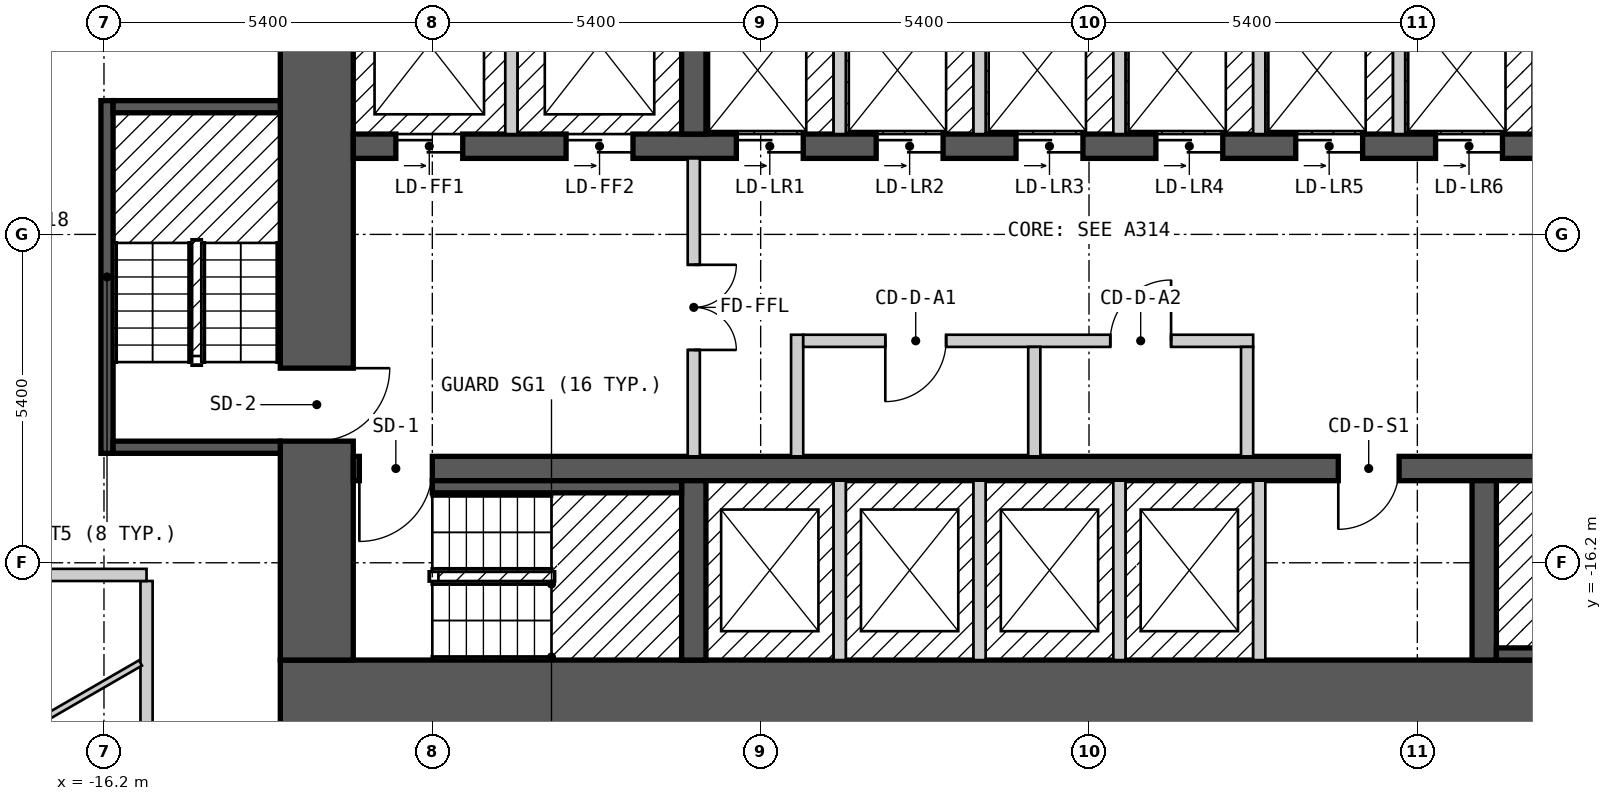
"""IFC4 building model, lengths in metres.
Left out: names, types, materials, properties, quantities, classifications, styles, units other than length and angle.
Written with IfcOpenShell. Run it as: python <this file> out.ifc"""

import sys

from ifc_helpers import new_model, si_unit, direction, frame, frame_2d, origin, place, context, subcontext, project, spatial, rectangle, extrude, element, fill, save


model = new_model("IFC4")
c1 = context("Model", 3, precision=1e-05, world=origin(), true_north=direction((0.0, 1.0)))
c2 = subcontext(c1, "Body", "Model", "MODEL_VIEW")
j1 = project(units=[si_unit("LENGTHUNIT", "METRE"), si_unit("PLANEANGLEUNIT", "RADIAN")], contexts=[c1])
p1 = place(None, origin())
s1 = spatial("IfcSite", under=j1, at=p1, CompositionType="ELEMENT")
p2 = place(p1, origin())
s2 = spatial("IfcBuilding", under=s1, at=p2, CompositionType="ELEMENT")
p3 = place(p2, frame((0.0, 0.0, 41.4)))
s3 = spatial("IfcBuildingStorey", under=s2, at=p3, CompositionType="ELEMENT", Elevation=41.4)
p4 = place(p3, frame((-13.3, -18.4, 0.0), z_axis=(0.0, 0.0, 1.0), x_axis=(1.0, 0.0, 0.0)))
e1 = element("IfcWall", 1, at=p4, inside=s3, PredefinedType="SHEAR", context=c2, shape_type="SweptSolid", body=[
    extrude(rectangle(XDim=26.6, YDim=1.2, at=frame_2d((13.3, 0.0))), origin(), (0.0, 0.0, 1.0), 2.7),
])
p5 = place(p3, frame((-12.7, -17.8, 0.0), z_axis=(0.0, 0.0, 1.0), x_axis=(0.0, 1.0, 0.0)))
e2 = element("IfcWall", 2, at=p5, inside=s3, PredefinedType="SHEAR", context=c2, shape_type="SweptSolid", body=[
    extrude(rectangle(XDim=11.6, YDim=1.2, at=frame_2d((5.8, 0.0))), origin(), (0.0, 0.0, 1.0), 2.7),
])
p6 = place(p5, frame((3.6, 0.0, 0.0)))
e3 = element("IfcOpeningElement", 3, at=p6, cuts=e2, PredefinedType="OPENING", context=c2, shape_type="SweptSolid", body=[
    extrude(rectangle(XDim=1.2, YDim=2.1, at=frame_2d((0.6, 1.05))), frame((0.0, 0.61, 0.0), z_axis=(0.0, -1.0, 0.0), x_axis=(1.0, 0.0, 0.0)), (0.0, 0.0, 1.0), 1.22),
])
p7 = place(p3, frame((-12.1, -14.65, 0.0), z_axis=(0.0, 0.0, 1.0), x_axis=(1.0, 0.0, 0.0)))
e4 = element("IfcWall", 4, at=p7, inside=s3, PredefinedType="SHEAR", context=c2, shape_type="SweptSolid", body=[
    extrude(rectangle(XDim=24.2, YDim=0.4, at=frame_2d((12.1, 0.0))), origin(), (0.0, 0.0, 1.0), 2.7),
])
p8 = place(p7, frame((1.3, 0.0, 0.0), z_axis=(0.0, 0.0, 1.0), x_axis=(-1.0, 0.0, 0.0)))
e5 = element("IfcOpeningElement", 5, at=p8, cuts=e4, PredefinedType="OPENING", context=c2, shape_type="SweptSolid", body=[
    extrude(rectangle(XDim=1.2, YDim=2.1, at=frame_2d((0.6, 1.05))), frame((0.0, 0.21, 0.0), z_axis=(0.0, -1.0, 0.0), x_axis=(1.0, 0.0, 0.0)), (0.0, 0.0, 1.0), 0.42),
])
p9 = place(p7, frame((24.15, 0.0, 0.0), z_axis=(0.0, 0.0, 1.0), x_axis=(-1.0, 0.0, 0.0)))
e6 = element("IfcOpeningElement", 6, at=p9, cuts=e4, PredefinedType="OPENING", context=c2, shape_type="SweptSolid", body=[
    extrude(rectangle(XDim=1.2, YDim=2.1, at=frame_2d((0.6, 1.05))), frame((0.0, 0.21, 0.0), z_axis=(0.0, -1.0, 0.0), x_axis=(1.0, 0.0, 0.0)), (0.0, 0.0, 1.0), 0.42),
])
p10 = place(p7, frame((17.2, 0.0, 0.0), z_axis=(0.0, 0.0, 1.0), x_axis=(-1.0, 0.0, 0.0)))
e7 = element("IfcOpeningElement", 7, at=p10, cuts=e4, PredefinedType="OPENING", context=c2, shape_type="SweptSolid", body=[
    extrude(rectangle(XDim=1.0, YDim=2.1, at=frame_2d((0.5, 1.05))), frame((0.0, 0.21, 0.0), z_axis=(0.0, -1.0, 0.0), x_axis=(1.0, 0.0, 0.0)), (0.0, 0.0, 1.0), 0.42),
])
p11 = place(p3, frame((-12.1, -9.35, 0.0), z_axis=(0.0, 0.0, 1.0), x_axis=(1.0, 0.0, 0.0)))
e8 = element("IfcWall", 8, at=p11, inside=s3, PredefinedType="SHEAR", context=c2, shape_type="SweptSolid", body=[
    extrude(rectangle(XDim=22.3, YDim=0.4, at=frame_2d((11.15, 0.0))), origin(), (0.0, 0.0, 1.0), 2.7),
])
p12 = place(p11, frame((0.7, 0.0, 0.0)))
e9 = element("IfcOpeningElement", 9, at=p12, cuts=e8, PredefinedType="OPENING", context=c2, shape_type="SweptSolid", body=[
    extrude(rectangle(XDim=1.1, YDim=2.1, at=frame_2d((0.55, 1.05))), frame((0.0, 0.21, 0.0), z_axis=(0.0, -1.0, 0.0), x_axis=(1.0, 0.0, 0.0)), (0.0, 0.0, 1.0), 0.42),
])
p13 = place(p11, frame((3.5, 0.0, 0.0)))
e10 = element("IfcOpeningElement", 10, at=p13, cuts=e8, PredefinedType="OPENING", context=c2, shape_type="SweptSolid", body=[
    extrude(rectangle(XDim=1.1, YDim=2.1, at=frame_2d((0.55, 1.05))), frame((0.0, 0.21, 0.0), z_axis=(0.0, -1.0, 0.0), x_axis=(1.0, 0.0, 0.0)), (0.0, 0.0, 1.0), 0.42),
])
p14 = place(p11, frame((6.3, 0.0, 0.0)))
e11 = element("IfcOpeningElement", 11, at=p14, cuts=e8, PredefinedType="OPENING", context=c2, shape_type="SweptSolid", body=[
    extrude(rectangle(XDim=1.1, YDim=2.1, at=frame_2d((0.55, 1.05))), frame((0.0, 0.21, 0.0), z_axis=(0.0, -1.0, 0.0), x_axis=(1.0, 0.0, 0.0)), (0.0, 0.0, 1.0), 0.42),
])
p15 = place(p11, frame((8.6, 0.0, 0.0)))
e12 = element("IfcOpeningElement", 12, at=p15, cuts=e8, PredefinedType="OPENING", context=c2, shape_type="SweptSolid", body=[
    extrude(rectangle(XDim=1.1, YDim=2.1, at=frame_2d((0.55, 1.05))), frame((0.0, 0.21, 0.0), z_axis=(0.0, -1.0, 0.0), x_axis=(1.0, 0.0, 0.0)), (0.0, 0.0, 1.0), 0.42),
])
p16 = place(p11, frame((10.9, 0.0, 0.0)))
e13 = element("IfcOpeningElement", 13, at=p16, cuts=e8, PredefinedType="OPENING", context=c2, shape_type="SweptSolid", body=[
    extrude(rectangle(XDim=1.1, YDim=2.1, at=frame_2d((0.55, 1.05))), frame((0.0, 0.21, 0.0), z_axis=(0.0, -1.0, 0.0), x_axis=(1.0, 0.0, 0.0)), (0.0, 0.0, 1.0), 0.42),
])
p17 = place(p11, frame((13.2, 0.0, 0.0)))
e14 = element("IfcOpeningElement", 14, at=p17, cuts=e8, PredefinedType="OPENING", context=c2, shape_type="SweptSolid", body=[
    extrude(rectangle(XDim=1.1, YDim=2.1, at=frame_2d((0.55, 1.05))), frame((0.0, 0.21, 0.0), z_axis=(0.0, -1.0, 0.0), x_axis=(1.0, 0.0, 0.0)), (0.0, 0.0, 1.0), 0.42),
])
p18 = place(p11, frame((15.5, 0.0, 0.0)))
e15 = element("IfcOpeningElement", 15, at=p18, cuts=e8, PredefinedType="OPENING", context=c2, shape_type="SweptSolid", body=[
    extrude(rectangle(XDim=1.1, YDim=2.1, at=frame_2d((0.55, 1.05))), frame((0.0, 0.21, 0.0), z_axis=(0.0, -1.0, 0.0), x_axis=(1.0, 0.0, 0.0)), (0.0, 0.0, 1.0), 0.42),
])
p19 = place(p11, frame((17.8, 0.0, 0.0)))
e16 = element("IfcOpeningElement", 16, at=p19, cuts=e8, PredefinedType="OPENING", context=c2, shape_type="SweptSolid", body=[
    extrude(rectangle(XDim=1.1, YDim=2.1, at=frame_2d((0.55, 1.05))), frame((0.0, 0.21, 0.0), z_axis=(0.0, -1.0, 0.0), x_axis=(1.0, 0.0, 0.0)), (0.0, 0.0, 1.0), 0.42),
])
p20 = place(p11, frame((20.2, 0.0, 0.0)))
e17 = element("IfcOpeningElement", 17, at=p20, cuts=e8, PredefinedType="OPENING", context=c2, shape_type="SweptSolid", body=[
    extrude(rectangle(XDim=1.1, YDim=2.1, at=frame_2d((0.55, 1.05))), frame((0.0, 0.21, 0.0), z_axis=(0.0, -1.0, 0.0), x_axis=(1.0, 0.0, 0.0)), (0.0, 0.0, 1.0), 0.42),
])
for number, where, z_axis, x_axis in (
    (18, (-6.5, -17.8, 0.0), (0.0, 0.0, 1.0), (0.0, 1.0, 0.0)),
    (19, (6.5, -17.8, 0.0), (0.0, 0.0, 1.0), (0.0, 1.0, 0.0)),
    (20, (-6.5, -9.15, 0.0), (0.0, 0.0, 1.0), (0.0, 1.0, 0.0)),
):
    element("IfcWall", number, at=place(p3, frame(where, z_axis=z_axis, x_axis=x_axis)), inside=s3, PredefinedType="SHEAR", context=c2, shape_type="SweptSolid", body=[
        extrude(rectangle(XDim=2.95, YDim=0.4, at=frame_2d((1.475, 0.0))), origin(), (0.0, 0.0, 1.0), 2.7),
    ])
p21 = place(p3, frame((-15.5, -16.5, 0.0), z_axis=(0.0, 0.0, 1.0), x_axis=(0.0, -1.0, 0.0)))
e21 = element("IfcWall", 21, at=p21, inside=s3, PredefinedType="PARTITIONING", context=c2, shape_type="SweptSolid", body=[
    extrude(rectangle(XDim=4.599, YDim=0.2, at=frame_2d((2.3, 0.0))), origin(), (0.0, 0.0, 1.0), 2.7),
])
p22 = place(p3, frame((-18.249, -16.4, 0.0), z_axis=(0.0, 0.0, 1.0), x_axis=(1.0, 0.0, 0.0)))
e22 = element("IfcWall", 22, at=p22, inside=s3, PredefinedType="PARTITIONING", context=c2, shape_type="SweptSolid", body=[
    extrude(rectangle(XDim=2.749, YDim=0.2, at=frame_2d((1.375, 0.0))), origin(), (0.0, 0.0, 1.0), 2.7),
])
p23 = place(p3, frame((-20.507, -20.681, 0.0), z_axis=(0.0, 0.0, 1.0), x_axis=(0.866028446103, 0.499994730513, 0.0)))
e23 = element("IfcWall", 23, at=p23, inside=s3, PredefinedType="PARTITIONING", context=c2, shape_type="SweptSolid", body=[
    extrude(rectangle(XDim=5.666, YDim=0.1, at=frame_2d((2.833, 0.0))), origin(), (0.0, 0.0, 1.0), 2.7),
])
p24 = place(p23, frame((2.44, 0.0, 0.0)))
e24 = element("IfcOpeningElement", 24, at=p24, cuts=e23, PredefinedType="OPENING", context=c2, shape_type="SweptSolid", body=[
    extrude(rectangle(XDim=0.9, YDim=2.1, at=frame_2d((0.45, 1.05))), frame((0.0, 0.06, 0.0), z_axis=(0.0, -1.0, 0.0), x_axis=(1.0, 0.0, 0.0)), (0.0, 0.0, 1.0), 0.12),
])
p25 = place(p3, frame((-16.15, -14.4, 0.0), z_axis=(0.0, 0.0, 1.0), x_axis=(0.0, 1.0, 0.0)))
e25 = element("IfcWall", 25, at=p25, inside=s3, PredefinedType="SOLIDWALL", context=c2, shape_type="SweptSolid", body=[
    extrude(rectangle(XDim=5.8, YDim=0.2, at=frame_2d((2.9, 0.0))), origin(), (0.0, 0.0, 1.0), 2.7),
])
for number, where, z_axis, x_axis in (
    (26, (-16.05, -14.3, 0.0), (0.0, 0.0, 1.0), (1.0, 0.0, 0.0)),
    (27, (-16.05, -8.7, 0.0), (0.0, 0.0, 1.0), (1.0, 0.0, 0.0)),
):
    element("IfcWall", number, at=place(p3, frame(where, z_axis=z_axis, x_axis=x_axis)), inside=s3, PredefinedType="SOLIDWALL", context=c2, shape_type="SweptSolid", body=[
        extrude(rectangle(XDim=2.75, YDim=0.2, at=frame_2d((1.375, 0.0))), origin(), (0.0, 0.0, 1.0), 2.7),
    ])
p26 = place(p3, frame((-10.8, -14.95, 0.0), z_axis=(0.0, 0.0, 1.0), x_axis=(1.0, 0.0, 0.0)))
e28 = element("IfcWall", 28, at=p26, inside=s3, PredefinedType="SOLIDWALL", context=c2, shape_type="SweptSolid", body=[
    extrude(rectangle(XDim=4.1, YDim=0.2, at=frame_2d((2.05, 0.0))), origin(), (0.0, 0.0, 1.0), 2.7),
])
p27 = place(p3, frame((-9.5, -9.15, 0.0), z_axis=(0.0, 0.0, 1.0), x_axis=(0.0, 1.0, 0.0)))
e29 = element("IfcWall", 29, at=p27, inside=s3, PredefinedType="SOLIDWALL", context=c2, shape_type="SweptSolid", body=[
    extrude(rectangle(XDim=2.95, YDim=0.2, at=frame_2d((1.475, 0.0))), origin(), (0.0, 0.0, 1.0), 2.7),
])
p28 = place(p3, frame((-6.5, -14.45, 0.0), z_axis=(0.0, 0.0, 1.0), x_axis=(0.0, 1.0, 0.0)))
e30 = element("IfcWall", 30, at=p28, inside=s3, PredefinedType="PARTITIONING", context=c2, shape_type="SweptSolid", body=[
    extrude(rectangle(XDim=4.9, YDim=0.2, at=frame_2d((2.45, 0.0))), origin(), (0.0, 0.0, 1.0), 2.7),
])
p29 = place(p28, frame((3.15, 0.0, 0.0), z_axis=(0.0, 0.0, 1.0), x_axis=(-1.0, 0.0, 0.0)))
e31 = element("IfcOpeningElement", 31, at=p29, cuts=e30, PredefinedType="OPENING", context=c2, shape_type="SweptSolid", body=[
    extrude(rectangle(XDim=1.4, YDim=2.1, at=frame_2d((0.7, 1.05))), frame((0.0, 0.11, 0.0), z_axis=(0.0, -1.0, 0.0), x_axis=(1.0, 0.0, 0.0)), (0.0, 0.0, 1.0), 0.22),
])
p30 = place(p3, frame((-4.8, -14.45, 0.0), z_axis=(0.0, 0.0, 1.0), x_axis=(0.0, 1.0, 0.0)))
e32 = element("IfcWall", 32, at=p30, inside=s3, PredefinedType="PARTITIONING", context=c2, shape_type="SweptSolid", body=[
    extrude(rectangle(XDim=2.0, YDim=0.2, at=frame_2d((1.0, 0.0))), origin(), (0.0, 0.0, 1.0), 2.7),
])
p31 = place(p3, frame((-4.7, -12.55, 0.0), z_axis=(0.0, 0.0, 1.0), x_axis=(1.0, 0.0, 0.0)))
e33 = element("IfcWall", 33, at=p31, inside=s3, PredefinedType="PARTITIONING", context=c2, shape_type="SweptSolid", body=[
    extrude(rectangle(XDim=7.4, YDim=0.2, at=frame_2d((3.7, 0.0))), origin(), (0.0, 0.0, 1.0), 2.7),
])
p32 = place(p31, frame((2.35, 0.0, 0.0), z_axis=(0.0, 0.0, 1.0), x_axis=(-1.0, 0.0, 0.0)))
e34 = element("IfcOpeningElement", 34, at=p32, cuts=e33, PredefinedType="OPENING", context=c2, shape_type="SweptSolid", body=[
    extrude(rectangle(XDim=1.0, YDim=2.1, at=frame_2d((0.5, 1.05))), frame((0.0, 0.11, 0.0), z_axis=(0.0, -1.0, 0.0), x_axis=(1.0, 0.0, 0.0)), (0.0, 0.0, 1.0), 0.22),
])
p33 = place(p31, frame((6.05, 0.0, 0.0), z_axis=(0.0, 0.0, 1.0), x_axis=(-1.0, 0.0, 0.0)))
e35 = element("IfcOpeningElement", 35, at=p33, cuts=e33, PredefinedType="OPENING", context=c2, shape_type="SweptSolid", body=[
    extrude(rectangle(XDim=1.0, YDim=2.1, at=frame_2d((0.5, 1.05))), frame((0.0, 0.11, 0.0), z_axis=(0.0, -1.0, 0.0), x_axis=(1.0, 0.0, 0.0)), (0.0, 0.0, 1.0), 0.22),
])
for number, where, z_axis, x_axis in (
    (36, (-4.1, -17.8, 0.0), (0.0, 0.0, 1.0), (0.0, 1.0, 0.0)),
    (37, (-4.1, -9.15, 0.0), (0.0, 0.0, 1.0), (0.0, 1.0, 0.0)),
    (38, (-1.8, -17.8, 0.0), (0.0, 0.0, 1.0), (0.0, 1.0, 0.0)),
    (39, (-1.8, -9.15, 0.0), (0.0, 0.0, 1.0), (0.0, 1.0, 0.0)),
):
    element("IfcWall", number, at=place(p3, frame(where, z_axis=z_axis, x_axis=x_axis)), inside=s3, PredefinedType="SOLIDWALL", context=c2, shape_type="SweptSolid", body=[
        extrude(rectangle(XDim=2.95, YDim=0.2, at=frame_2d((1.475, 0.0))), origin(), (0.0, 0.0, 1.0), 2.7),
    ])
p34 = place(p3, frame((-0.9, -14.45, 0.0), z_axis=(0.0, 0.0, 1.0), x_axis=(0.0, 1.0, 0.0)))
e40 = element("IfcWall", 40, at=p34, inside=s3, PredefinedType="PARTITIONING", context=c2, shape_type="SweptSolid", body=[
    extrude(rectangle(XDim=1.8, YDim=0.2, at=frame_2d((0.9, 0.0))), origin(), (0.0, 0.0, 1.0), 2.7),
])
for number, where, z_axis, x_axis in (
    (41, (0.5, -17.8, 0.0), (0.0, 0.0, 1.0), (0.0, 1.0, 0.0)),
    (42, (0.5, -9.15, 0.0), (0.0, 0.0, 1.0), (0.0, 1.0, 0.0)),
):
    element("IfcWall", number, at=place(p3, frame(where, z_axis=z_axis, x_axis=x_axis)), inside=s3, PredefinedType="SOLIDWALL", context=c2, shape_type="SweptSolid", body=[
        extrude(rectangle(XDim=2.95, YDim=0.2, at=frame_2d((1.475, 0.0))), origin(), (0.0, 0.0, 1.0), 2.7),
    ])
p35 = place(p3, frame((2.6, -14.45, 0.0), z_axis=(0.0, 0.0, 1.0), x_axis=(0.0, 1.0, 0.0)))
e43 = element("IfcWall", 43, at=p35, inside=s3, PredefinedType="PARTITIONING", context=c2, shape_type="SweptSolid", body=[
    extrude(rectangle(XDim=1.8, YDim=0.2, at=frame_2d((0.9, 0.0))), origin(), (0.0, 0.0, 1.0), 2.7),
])
for number, where, z_axis, x_axis in (
    (44, (2.8, -17.8, 0.0), (0.0, 0.0, 1.0), (0.0, 1.0, 0.0)),
    (45, (2.8, -9.15, 0.0), (0.0, 0.0, 1.0), (0.0, 1.0, 0.0)),
    (46, (5.1, -9.15, 0.0), (0.0, 0.0, 1.0), (0.0, 1.0, 0.0)),
):
    element("IfcWall", number, at=place(p3, frame(where, z_axis=z_axis, x_axis=x_axis)), inside=s3, PredefinedType="SOLIDWALL", context=c2, shape_type="SweptSolid", body=[
        extrude(rectangle(XDim=2.95, YDim=0.2, at=frame_2d((1.475, 0.0))), origin(), (0.0, 0.0, 1.0), 2.7),
    ])
p36 = place(p3, frame((6.7, -17.7, 0.0), z_axis=(0.0, 0.0, 1.0), x_axis=(1.0, 0.0, 0.0)))
e47 = element("IfcWall", 47, at=p36, inside=s3, PredefinedType="SOLIDWALL", context=c2, shape_type="SweptSolid", body=[
    extrude(rectangle(XDim=5.4, YDim=0.2, at=frame_2d((2.7, 0.0))), origin(), (0.0, 0.0, 1.0), 2.7),
])
p37 = place(p3, frame((7.4, -9.15, 0.0), z_axis=(0.0, 0.0, 1.0), x_axis=(0.0, 1.0, 0.0)))
e48 = element("IfcWall", 48, at=p37, inside=s3, PredefinedType="SOLIDWALL", context=c2, shape_type="SweptSolid", body=[
    extrude(rectangle(XDim=2.95, YDim=0.2, at=frame_2d((1.475, 0.0))), origin(), (0.0, 0.0, 1.0), 2.7),
])
p38 = place(p12, origin())
e49 = element("IfcDoor", 49, at=p38, inside=s3, OperationType="DOUBLE_DOOR_SLIDING", PredefinedType="DOOR", context=c2, shape_type="SweptSolid", body=[
    extrude(rectangle(XDim=1.1, YDim=2.1, at=frame_2d((0.55, 1.05))), frame((0.0, 0.025, 0.0), z_axis=(0.0, -1.0, 0.0), x_axis=(1.0, 0.0, 0.0)), (0.0, 0.0, 1.0), 0.05),
])
fill(e9, e49)
p39 = place(p13, origin())
e50 = element("IfcDoor", 50, at=p39, inside=s3, OperationType="DOUBLE_DOOR_SLIDING", PredefinedType="DOOR", context=c2, shape_type="SweptSolid", body=[
    extrude(rectangle(XDim=1.1, YDim=2.1, at=frame_2d((0.55, 1.05))), frame((0.0, 0.025, 0.0), z_axis=(0.0, -1.0, 0.0), x_axis=(1.0, 0.0, 0.0)), (0.0, 0.0, 1.0), 0.05),
])
fill(e10, e50)
p40 = place(p14, origin())
e51 = element("IfcDoor", 51, at=p40, inside=s3, OperationType="DOUBLE_DOOR_SLIDING", PredefinedType="DOOR", context=c2, shape_type="SweptSolid", body=[
    extrude(rectangle(XDim=1.1, YDim=2.1, at=frame_2d((0.55, 1.05))), frame((0.0, 0.025, 0.0), z_axis=(0.0, -1.0, 0.0), x_axis=(1.0, 0.0, 0.0)), (0.0, 0.0, 1.0), 0.05),
])
fill(e11, e51)
p41 = place(p15, origin())
e52 = element("IfcDoor", 52, at=p41, inside=s3, OperationType="DOUBLE_DOOR_SLIDING", PredefinedType="DOOR", context=c2, shape_type="SweptSolid", body=[
    extrude(rectangle(XDim=1.1, YDim=2.1, at=frame_2d((0.55, 1.05))), frame((0.0, 0.025, 0.0), z_axis=(0.0, -1.0, 0.0), x_axis=(1.0, 0.0, 0.0)), (0.0, 0.0, 1.0), 0.05),
])
fill(e12, e52)
p42 = place(p16, origin())
e53 = element("IfcDoor", 53, at=p42, inside=s3, OperationType="DOUBLE_DOOR_SLIDING", PredefinedType="DOOR", context=c2, shape_type="SweptSolid", body=[
    extrude(rectangle(XDim=1.1, YDim=2.1, at=frame_2d((0.55, 1.05))), frame((0.0, 0.025, 0.0), z_axis=(0.0, -1.0, 0.0), x_axis=(1.0, 0.0, 0.0)), (0.0, 0.0, 1.0), 0.05),
])
fill(e13, e53)
p43 = place(p17, origin())
e54 = element("IfcDoor", 54, at=p43, inside=s3, OperationType="DOUBLE_DOOR_SLIDING", PredefinedType="DOOR", context=c2, shape_type="SweptSolid", body=[
    extrude(rectangle(XDim=1.1, YDim=2.1, at=frame_2d((0.55, 1.05))), frame((0.0, 0.025, 0.0), z_axis=(0.0, -1.0, 0.0), x_axis=(1.0, 0.0, 0.0)), (0.0, 0.0, 1.0), 0.05),
])
fill(e14, e54)
p44 = place(p18, origin())
e55 = element("IfcDoor", 55, at=p44, inside=s3, OperationType="DOUBLE_DOOR_SLIDING", PredefinedType="DOOR", context=c2, shape_type="SweptSolid", body=[
    extrude(rectangle(XDim=1.1, YDim=2.1, at=frame_2d((0.55, 1.05))), frame((0.0, 0.025, 0.0), z_axis=(0.0, -1.0, 0.0), x_axis=(1.0, 0.0, 0.0)), (0.0, 0.0, 1.0), 0.05),
])
fill(e15, e55)
p45 = place(p19, origin())
e56 = element("IfcDoor", 56, at=p45, inside=s3, OperationType="DOUBLE_DOOR_SLIDING", PredefinedType="DOOR", context=c2, shape_type="SweptSolid", body=[
    extrude(rectangle(XDim=1.1, YDim=2.1, at=frame_2d((0.55, 1.05))), frame((0.0, 0.025, 0.0), z_axis=(0.0, -1.0, 0.0), x_axis=(1.0, 0.0, 0.0)), (0.0, 0.0, 1.0), 0.05),
])
fill(e16, e56)
p46 = place(p8, origin())
e57 = element("IfcDoor", 57, at=p46, inside=s3, OperationType="SINGLE_SWING_RIGHT", PredefinedType="DOOR", context=c2, shape_type="SweptSolid", body=[
    extrude(rectangle(XDim=1.2, YDim=2.1, at=frame_2d((0.6, 1.05))), frame((0.0, 0.025, 0.0), z_axis=(0.0, -1.0, 0.0), x_axis=(1.0, 0.0, 0.0)), (0.0, 0.0, 1.0), 0.05),
])
fill(e5, e57)
p47 = place(p6, origin())
e58 = element("IfcDoor", 58, at=p47, inside=s3, OperationType="SINGLE_SWING_RIGHT", PredefinedType="DOOR", context=c2, shape_type="SweptSolid", body=[
    extrude(rectangle(XDim=1.2, YDim=2.1, at=frame_2d((0.6, 1.05))), frame((0.0, 0.025, 0.0), z_axis=(0.0, -1.0, 0.0), x_axis=(1.0, 0.0, 0.0)), (0.0, 0.0, 1.0), 0.05),
])
fill(e3, e58)
p48 = place(p29, origin())
e59 = element("IfcDoor", 59, at=p48, inside=s3, OperationType="DOUBLE_DOOR_SINGLE_SWING", PredefinedType="DOOR", context=c2, shape_type="SweptSolid", body=[
    extrude(rectangle(XDim=1.4, YDim=2.1, at=frame_2d((0.7, 1.05))), frame((0.0, 0.025, 0.0), z_axis=(0.0, -1.0, 0.0), x_axis=(1.0, 0.0, 0.0)), (0.0, 0.0, 1.0), 0.05),
])
fill(e31, e59)
p49 = place(p32, origin())
e60 = element("IfcDoor", 60, at=p49, inside=s3, OperationType="SINGLE_SWING_RIGHT", PredefinedType="DOOR", context=c2, shape_type="SweptSolid", body=[
    extrude(rectangle(XDim=1.0, YDim=2.1, at=frame_2d((0.5, 1.05))), frame((0.0, 0.025, 0.0), z_axis=(0.0, -1.0, 0.0), x_axis=(1.0, 0.0, 0.0)), (0.0, 0.0, 1.0), 0.05),
])
fill(e34, e60)
p50 = place(p33, origin())
e61 = element("IfcDoor", 61, at=p50, inside=s3, OperationType="SINGLE_SWING_LEFT", PredefinedType="DOOR", context=c2, shape_type="SweptSolid", body=[
    extrude(rectangle(XDim=1.0, YDim=2.1, at=frame_2d((0.5, 1.05))), frame((0.0, 0.025, 0.0), z_axis=(0.0, -1.0, 0.0), x_axis=(1.0, 0.0, 0.0)), (0.0, 0.0, 1.0), 0.05),
])
fill(e35, e61)
p51 = place(p10, origin())
e62 = element("IfcDoor", 62, at=p51, inside=s3, OperationType="SINGLE_SWING_RIGHT", PredefinedType="DOOR", context=c2, shape_type="SweptSolid", body=[
    extrude(rectangle(XDim=1.0, YDim=2.1, at=frame_2d((0.5, 1.05))), frame((0.0, 0.025, 0.0), z_axis=(0.0, -1.0, 0.0), x_axis=(1.0, 0.0, 0.0)), (0.0, 0.0, 1.0), 0.05),
])
fill(e7, e62)
save(model, sys.argv[1])
